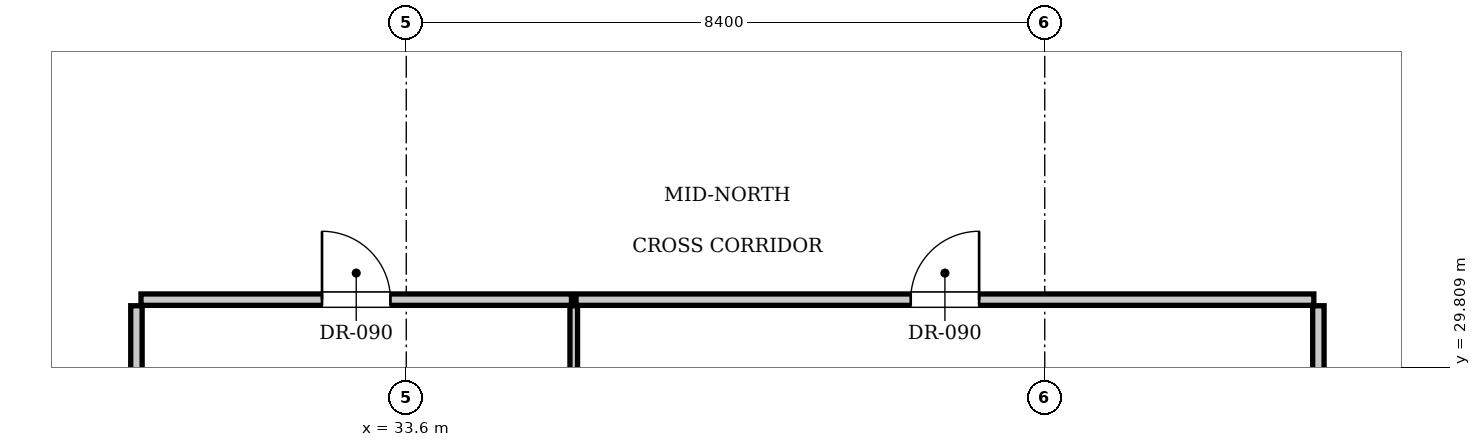
"""IFC4 building model, lengths in metres.
Left out: names, types, materials, properties, quantities, classifications, styles, units other than length and angle.
Written with IfcOpenShell. Run it as: python <this file> out.ifc"""

import sys

from ifc_helpers import new_model, si_unit, direction, frame, frame_2d, origin, place, context, subcontext, project, spatial, rectangle, extrude, element, fill, save


model = new_model("IFC4")
c1 = context("Model", 3, precision=1e-05, world=origin(), true_north=direction((0.0, 1.0)))
c2 = subcontext(c1, "Body", "Model", "MODEL_VIEW")
j1 = project(units=[si_unit("LENGTHUNIT", "METRE"), si_unit("PLANEANGLEUNIT", "RADIAN")], contexts=[c1])
p1 = place(None, origin())
s1 = spatial("IfcSite", under=j1, at=p1, CompositionType="ELEMENT")
p2 = place(p1, origin())
s2 = spatial("IfcBuilding", under=s1, at=p2, CompositionType="ELEMENT")
p3 = place(p2, frame((0.0, 0.0, 247.1)))
s3 = spatial("IfcBuildingStorey", under=s2, at=p3, CompositionType="ELEMENT", Elevation=247.1)
for number, where, z_axis, x_axis in (
    (1, (30.05, 21.13, 0.0), (0.0, 0.0, 1.0), (0.0, 1.0, 0.0)),
    (2, (45.6, 21.13, 0.0), (0.0, 0.0, 1.0), (0.0, 1.0, 0.0)),
):
    element("IfcWall", number, at=place(p3, frame(where, z_axis=z_axis, x_axis=x_axis)), inside=s3, PredefinedType="PARTITIONING", context=c2, shape_type="SweptSolid", body=[
        extrude(rectangle(XDim=9.49, YDim=0.15, at=frame_2d((4.745, 0.0))), origin(), (0.0, 0.0, 1.0), 3.61),
    ])
p4 = place(p3, frame((30.11, 30.7, 0.0), z_axis=(0.0, 0.0, 1.0), x_axis=(1.0, 0.0, 0.0)))
e3 = element("IfcWall", 3, at=p4, inside=s3, PredefinedType="PARTITIONING", context=c2, shape_type="SweptSolid", body=[
    extrude(rectangle(XDim=5.663, YDim=0.15, at=frame_2d((2.832, 0.0))), origin(), (0.0, 0.0, 1.0), 3.61),
])
p5 = place(p4, frame((2.382, 0.0, 0.0)))
e4 = element("IfcOpeningElement", 4, at=p5, cuts=e3, PredefinedType="OPENING", context=c2, shape_type="SweptSolid", body=[
    extrude(rectangle(XDim=0.9, YDim=2.1, at=frame_2d((0.45, 1.05))), frame((0.0, 0.085, 0.0), z_axis=(0.0, -1.0, 0.0), x_axis=(1.0, 0.0, 0.0)), (0.0, 0.0, 1.0), 0.17),
])
p6 = place(p3, frame((35.803, 21.13, 0.0), z_axis=(0.0, 0.0, 1.0), x_axis=(0.0, 1.0, 0.0)))
e5 = element("IfcWall", 5, at=p6, inside=s3, PredefinedType="PARTITIONING", context=c2, shape_type="SweptSolid", body=[
    extrude(rectangle(XDim=9.49, YDim=0.1, at=frame_2d((4.745, 0.0))), origin(), (0.0, 0.0, 1.0), 3.61),
])
p7 = place(p3, frame((35.833, 30.7, 0.0), z_axis=(0.0, 0.0, 1.0), x_axis=(1.0, 0.0, 0.0)))
e6 = element("IfcWall", 6, at=p7, inside=s3, PredefinedType="PARTITIONING", context=c2, shape_type="SweptSolid", body=[
    extrude(rectangle(XDim=9.707, YDim=0.15, at=frame_2d((4.853, 0.0))), origin(), (0.0, 0.0, 1.0), 3.61),
])
p8 = place(p7, frame((4.403, 0.0, 0.0)))
e7 = element("IfcOpeningElement", 7, at=p8, cuts=e6, PredefinedType="OPENING", context=c2, shape_type="SweptSolid", body=[
    extrude(rectangle(XDim=0.9, YDim=2.1, at=frame_2d((0.45, 1.05))), frame((0.0, 0.085, 0.0), z_axis=(0.0, -1.0, 0.0), x_axis=(1.0, 0.0, 0.0)), (0.0, 0.0, 1.0), 0.17),
])
p9 = place(p5, origin())
e8 = element("IfcDoor", 8, at=p9, inside=s3, OperationType="SINGLE_SWING_LEFT", PredefinedType="DOOR", context=c2, shape_type="SweptSolid", body=[
    extrude(rectangle(XDim=0.9, YDim=2.1, at=frame_2d((0.45, 1.05))), frame((0.0, 0.025, 0.0), z_axis=(0.0, -1.0, 0.0), x_axis=(1.0, 0.0, 0.0)), (0.0, 0.0, 1.0), 0.05),
])
fill(e4, e8)
p10 = place(p8, origin())
e9 = element("IfcDoor", 9, at=p10, inside=s3, OperationType="SINGLE_SWING_RIGHT", PredefinedType="DOOR", context=c2, shape_type="SweptSolid", body=[
    extrude(rectangle(XDim=0.9, YDim=2.1, at=frame_2d((0.45, 1.05))), frame((0.0, 0.025, 0.0), z_axis=(0.0, -1.0, 0.0), x_axis=(1.0, 0.0, 0.0)), (0.0, 0.0, 1.0), 0.05),
])
fill(e7, e9)
save(model, sys.argv[1])
